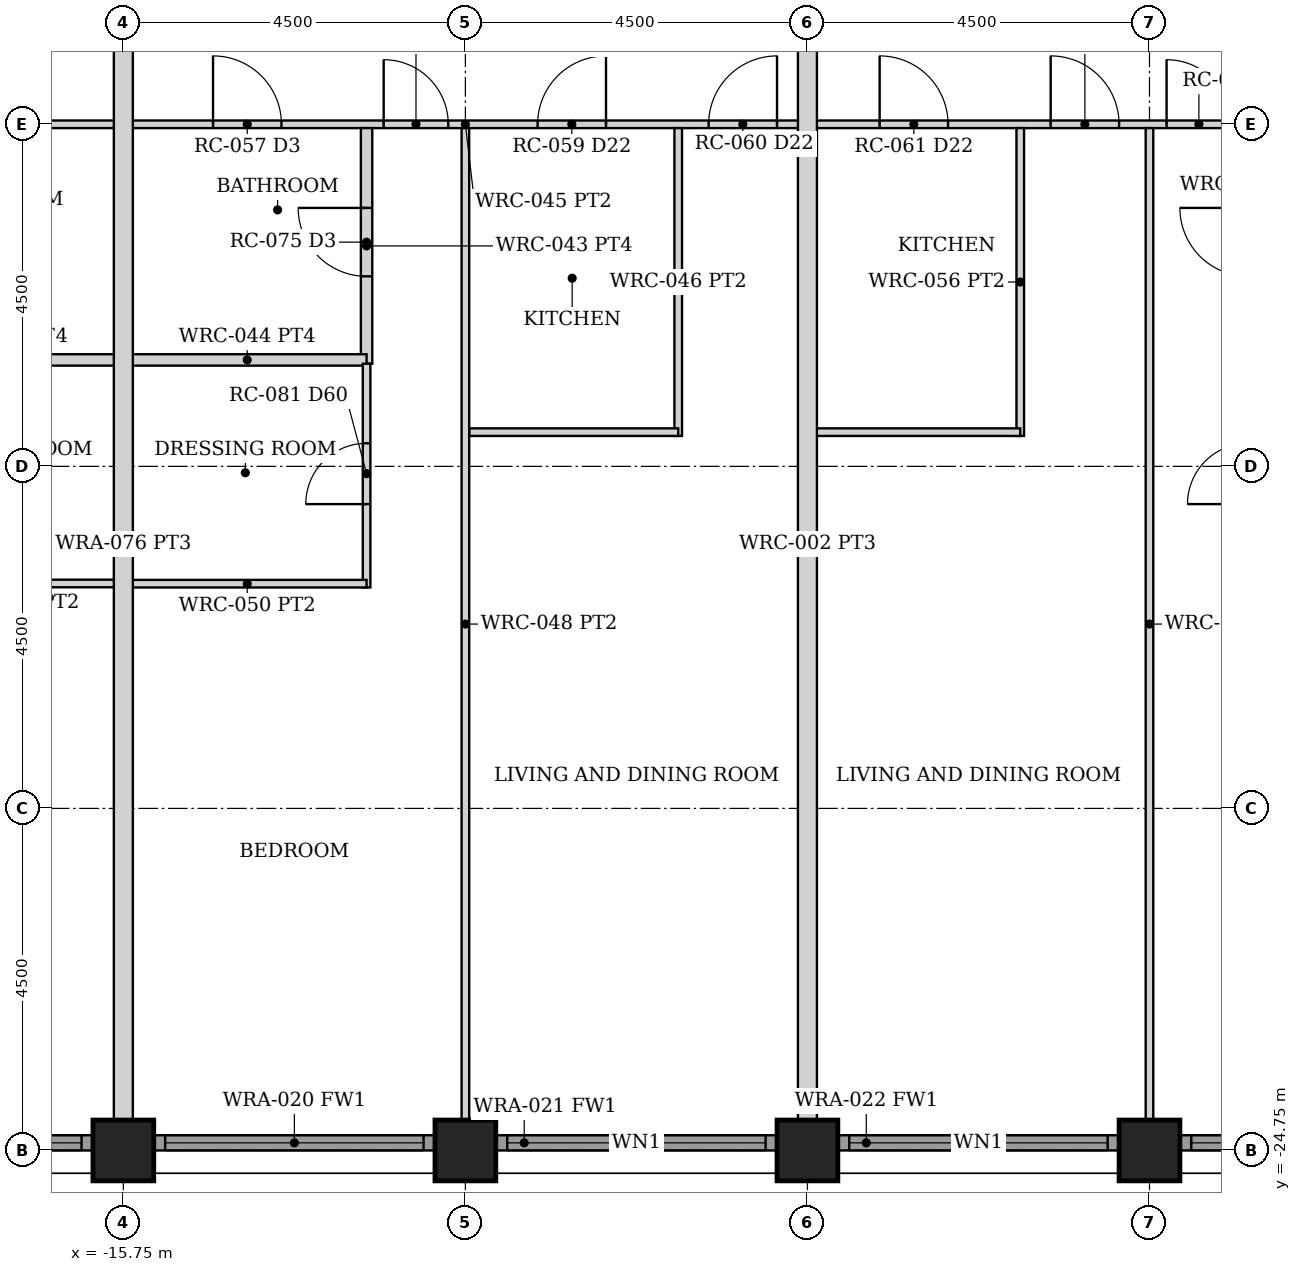
"""IFC4 building model, lengths in metres.
Left out: names, types, materials, properties, quantities, classifications, styles, units other than length and angle.
Written with IfcOpenShell. Run it as: python <this file> out.ifc"""

import sys

from ifc_helpers import new_model, si_unit, direction, frame, frame_2d, origin, origin_2d, place, context, subcontext, project, spatial, rectangle, hollow_rectangle, extrude, element, fill, save


model = new_model("IFC4")
c1 = context("Model", 3, precision=1e-05, world=origin(), true_north=direction((0.0, 1.0)))
c2 = subcontext(c1, "Body", "Model", "MODEL_VIEW")
j1 = project(units=[si_unit("LENGTHUNIT", "METRE"), si_unit("PLANEANGLEUNIT", "RADIAN")], contexts=[c1])
p1 = place(None, origin())
s1 = spatial("IfcSite", under=j1, at=p1, CompositionType="ELEMENT")
p2 = place(p1, origin())
s2 = spatial("IfcBuilding", under=s1, at=p2, CompositionType="ELEMENT")
p3 = place(p2, frame((0.0, 0.0, 47.5)))
s3 = spatial("IfcBuildingStorey", under=s2, at=p3, CompositionType="ELEMENT", Elevation=47.5)
for number, where, z_axis, x_axis in (
    (1, (-15.75, -24.75, 0.0), (0.0, 0.0, 1.0), (0.0, 1.0, 0.0)),
    (2, (-11.25, -24.75, 0.0), (0.0, 0.0, 1.0), (0.0, 1.0, 0.0)),
    (3, (-6.75, -24.75, 0.0), (0.0, 0.0, 1.0), (0.0, 1.0, 0.0)),
    (4, (-2.25, -24.75, 0.0), (0.0, 0.0, 1.0), (0.0, 1.0, 0.0)),
):
    element("IfcColumn", number, at=place(p3, frame(where, z_axis=z_axis, x_axis=x_axis)), inside=s3, PredefinedType="COLUMN", context=c2, shape_type="SweptSolid", body=[
        extrude(hollow_rectangle(XDim=0.8, YDim=0.8, WallThickness=0.07, at=origin_2d()), origin(), (0.0, 0.0, 1.0), 3.5),
    ])
p4 = place(p3, frame((-19.845, -24.65, 0.0), z_axis=(0.0, 0.0, 1.0), x_axis=(1.0, 0.0, 0.0)))
e5 = element("IfcWall", 5, at=p4, inside=s3, PredefinedType="SOLIDWALL", context=c2, shape_type="SweptSolid", body=[
    extrude(rectangle(XDim=3.69, YDim=0.2, at=frame_2d((1.845, 0.0))), origin(), (0.0, 0.0, 1.0), 2.379),
])
p5 = place(p4, frame((0.145, 0.0, 0.3)))
e6 = element("IfcOpeningElement", 6, at=p5, cuts=e5, PredefinedType="OPENING", context=c2, shape_type="SweptSolid", body=[
    extrude(rectangle(XDim=3.4, YDim=1.929, at=frame_2d((1.7, 0.964))), frame((0.0, 0.11, 0.0), z_axis=(0.0, -1.0, 0.0), x_axis=(1.0, 0.0, 0.0)), (0.0, 0.0, 1.0), 0.22),
])
p6 = place(p3, frame((-15.345, -24.65, 0.0), z_axis=(0.0, 0.0, 1.0), x_axis=(1.0, 0.0, 0.0)))
e7 = element("IfcWall", 7, at=p6, inside=s3, PredefinedType="SOLIDWALL", context=c2, shape_type="SweptSolid", body=[
    extrude(rectangle(XDim=3.69, YDim=0.2, at=frame_2d((1.845, 0.0))), origin(), (0.0, 0.0, 1.0), 2.379),
])
p7 = place(p6, frame((0.145, 0.0, 0.3)))
e8 = element("IfcOpeningElement", 8, at=p7, cuts=e7, PredefinedType="OPENING", context=c2, shape_type="SweptSolid", body=[
    extrude(rectangle(XDim=3.4, YDim=1.929, at=frame_2d((1.7, 0.964))), frame((0.0, 0.11, 0.0), z_axis=(0.0, -1.0, 0.0), x_axis=(1.0, 0.0, 0.0)), (0.0, 0.0, 1.0), 0.22),
])
p8 = place(p3, frame((-10.845, -24.65, 0.0), z_axis=(0.0, 0.0, 1.0), x_axis=(1.0, 0.0, 0.0)))
e9 = element("IfcWall", 9, at=p8, inside=s3, PredefinedType="SOLIDWALL", context=c2, shape_type="SweptSolid", body=[
    extrude(rectangle(XDim=3.69, YDim=0.2, at=frame_2d((1.845, 0.0))), origin(), (0.0, 0.0, 1.0), 2.379),
])
p9 = place(p8, frame((0.145, 0.0, 0.3)))
e10 = element("IfcOpeningElement", 10, at=p9, cuts=e9, PredefinedType="OPENING", context=c2, shape_type="SweptSolid", body=[
    extrude(rectangle(XDim=3.4, YDim=1.929, at=frame_2d((1.7, 0.964))), frame((0.0, 0.11, 0.0), z_axis=(0.0, -1.0, 0.0), x_axis=(1.0, 0.0, 0.0)), (0.0, 0.0, 1.0), 0.22),
])
p10 = place(p3, frame((-6.345, -24.65, 0.0), z_axis=(0.0, 0.0, 1.0), x_axis=(1.0, 0.0, 0.0)))
e11 = element("IfcWall", 11, at=p10, inside=s3, PredefinedType="SOLIDWALL", context=c2, shape_type="SweptSolid", body=[
    extrude(rectangle(XDim=3.69, YDim=0.2, at=frame_2d((1.845, 0.0))), origin(), (0.0, 0.0, 1.0), 2.379),
])
p11 = place(p10, frame((0.145, 0.0, 0.3)))
e12 = element("IfcOpeningElement", 12, at=p11, cuts=e11, PredefinedType="OPENING", context=c2, shape_type="SweptSolid", body=[
    extrude(rectangle(XDim=3.4, YDim=1.929, at=frame_2d((1.7, 0.964))), frame((0.0, 0.11, 0.0), z_axis=(0.0, -1.0, 0.0), x_axis=(1.0, 0.0, 0.0)), (0.0, 0.0, 1.0), 0.22),
])
p12 = place(p3, frame((-1.845, -24.65, 0.0), z_axis=(0.0, 0.0, 1.0), x_axis=(1.0, 0.0, 0.0)))
e13 = element("IfcWall", 13, at=p12, inside=s3, PredefinedType="SOLIDWALL", context=c2, shape_type="SweptSolid", body=[
    extrude(rectangle(XDim=3.69, YDim=0.2, at=frame_2d((1.845, 0.0))), origin(), (0.0, 0.0, 1.0), 2.379),
])
p13 = place(p12, frame((0.145, 0.0, 0.3)))
e14 = element("IfcOpeningElement", 14, at=p13, cuts=e13, PredefinedType="OPENING", context=c2, shape_type="SweptSolid", body=[
    extrude(rectangle(XDim=3.4, YDim=1.929, at=frame_2d((1.7, 0.964))), frame((0.0, 0.11, 0.0), z_axis=(0.0, -1.0, 0.0), x_axis=(1.0, 0.0, 0.0)), (0.0, 0.0, 1.0), 0.22),
])
p14 = place(p3, frame((-24.35, -11.25, 0.0), z_axis=(0.0, 0.0, 1.0), x_axis=(1.0, 0.0, 0.0)))
e15 = element("IfcWall", 15, at=p14, inside=s3, PredefinedType="PARTITIONING", context=c2, shape_type="SweptSolid", body=[
    extrude(rectangle(XDim=8.5, YDim=0.1, at=frame_2d((4.25, 0.0))), origin(), (0.0, 0.0, 1.0), 2.373),
])
p15 = place(p14, frame((2.375, 0.0, 0.0)))
e16 = element("IfcOpeningElement", 16, at=p15, cuts=e15, PredefinedType="OPENING", context=c2, shape_type="SweptSolid", body=[
    extrude(rectangle(XDim=0.9, YDim=2.1, at=frame_2d((0.45, 1.05))), frame((0.0, 0.06, 0.0), z_axis=(0.0, -1.0, 0.0), x_axis=(1.0, 0.0, 0.0)), (0.0, 0.0, 1.0), 0.12),
])
p16 = place(p14, frame((0.35, 0.0, 0.0)))
e17 = element("IfcOpeningElement", 17, at=p16, cuts=e15, PredefinedType="OPENING", context=c2, shape_type="SweptSolid", body=[
    extrude(rectangle(XDim=0.9, YDim=2.1, at=frame_2d((0.45, 1.05))), frame((0.0, 0.06, 0.0), z_axis=(0.0, -1.0, 0.0), x_axis=(1.0, 0.0, 0.0)), (0.0, 0.0, 1.0), 0.12),
])
p17 = place(p14, frame((4.325, 0.0, 0.0)))
e18 = element("IfcOpeningElement", 18, at=p17, cuts=e15, PredefinedType="OPENING", context=c2, shape_type="SweptSolid", body=[
    extrude(rectangle(XDim=0.85, YDim=2.1, at=frame_2d((0.425, 1.05))), frame((0.0, 0.06, 0.0), z_axis=(0.0, -1.0, 0.0), x_axis=(1.0, 0.0, 0.0)), (0.0, 0.0, 1.0), 0.12),
])
p18 = place(p14, frame((6.52, 0.0, 0.0)))
e19 = element("IfcOpeningElement", 19, at=p18, cuts=e15, PredefinedType="OPENING", context=c2, shape_type="SweptSolid", body=[
    extrude(rectangle(XDim=0.9, YDim=2.1, at=frame_2d((0.45, 1.05))), frame((0.0, 0.06, 0.0), z_axis=(0.0, -1.0, 0.0), x_axis=(1.0, 0.0, 0.0)), (0.0, 0.0, 1.0), 0.12),
])
p19 = place(p3, frame((-18.95, -14.35, 0.0), z_axis=(0.0, 0.0, 1.0), x_axis=(1.0, 0.0, 0.0)))
e20 = element("IfcWall", 20, at=p19, inside=s3, PredefinedType="PARTITIONING", context=c2, shape_type="SweptSolid", body=[
    extrude(rectangle(XDim=3.14, YDim=0.15, at=frame_2d((1.57, 0.0))), origin(), (0.0, 0.0, 1.0), 2.373),
])
p20 = place(p3, frame((-18.95, -17.291, 0.0), z_axis=(0.0, 0.0, 1.0), x_axis=(1.0, 0.0, 0.0)))
e21 = element("IfcWall", 21, at=p20, inside=s3, PredefinedType="PARTITIONING", context=c2, shape_type="SweptSolid", body=[
    extrude(rectangle(XDim=3.14, YDim=0.1, at=frame_2d((1.57, 0.0))), origin(), (0.0, 0.0, 1.0), 2.373),
])
p21 = place(p3, frame((-15.65, -11.25, 0.0), z_axis=(0.0, 0.0, 1.0), x_axis=(1.0, 0.0, 0.0)))
e22 = element("IfcWall", 22, at=p21, inside=s3, PredefinedType="PARTITIONING", context=c2, shape_type="SweptSolid", body=[
    extrude(rectangle(XDim=8.8, YDim=0.1, at=frame_2d((4.4, 0.0))), origin(), (0.0, 0.0, 1.0), 2.373),
])
p22 = place(p21, frame((5.35, 0.0, 0.0)))
e23 = element("IfcOpeningElement", 23, at=p22, cuts=e22, PredefinedType="OPENING", context=c2, shape_type="SweptSolid", body=[
    extrude(rectangle(XDim=0.9, YDim=2.1, at=frame_2d((0.45, 1.05))), frame((0.0, 0.06, 0.0), z_axis=(0.0, -1.0, 0.0), x_axis=(1.0, 0.0, 0.0)), (0.0, 0.0, 1.0), 0.12),
])
p23 = place(p21, frame((7.6, 0.0, 0.0)))
e24 = element("IfcOpeningElement", 24, at=p23, cuts=e22, PredefinedType="OPENING", context=c2, shape_type="SweptSolid", body=[
    extrude(rectangle(XDim=0.9, YDim=2.1, at=frame_2d((0.45, 1.05))), frame((0.0, 0.06, 0.0), z_axis=(0.0, -1.0, 0.0), x_axis=(1.0, 0.0, 0.0)), (0.0, 0.0, 1.0), 0.12),
])
p24 = place(p21, frame((3.325, 0.0, 0.0)))
e25 = element("IfcOpeningElement", 25, at=p24, cuts=e22, PredefinedType="OPENING", context=c2, shape_type="SweptSolid", body=[
    extrude(rectangle(XDim=0.85, YDim=2.1, at=frame_2d((0.425, 1.05))), frame((0.0, 0.06, 0.0), z_axis=(0.0, -1.0, 0.0), x_axis=(1.0, 0.0, 0.0)), (0.0, 0.0, 1.0), 0.12),
])
p25 = place(p21, frame((1.08, 0.0, 0.0)))
e26 = element("IfcOpeningElement", 26, at=p25, cuts=e22, PredefinedType="OPENING", context=c2, shape_type="SweptSolid", body=[
    extrude(rectangle(XDim=0.9, YDim=2.1, at=frame_2d((0.45, 1.05))), frame((0.0, 0.06, 0.0), z_axis=(0.0, -1.0, 0.0), x_axis=(1.0, 0.0, 0.0)), (0.0, 0.0, 1.0), 0.12),
])
p26 = place(p3, frame((-8.45, -15.35, 0.0), z_axis=(0.0, 0.0, 1.0), x_axis=(0.0, 1.0, 0.0)))
e27 = element("IfcWall", 27, at=p26, inside=s3, PredefinedType="PARTITIONING", context=c2, shape_type="SweptSolid", body=[
    extrude(rectangle(XDim=4.05, YDim=0.1, at=frame_2d((2.025, 0.0))), origin(), (0.0, 0.0, 1.0), 2.373),
])
p27 = place(p3, frame((-11.2, -15.3, 0.0), z_axis=(0.0, 0.0, 1.0), x_axis=(1.0, 0.0, 0.0)))
e28 = element("IfcWall", 28, at=p27, inside=s3, PredefinedType="PARTITIONING", context=c2, shape_type="SweptSolid", body=[
    extrude(rectangle(XDim=2.75, YDim=0.1, at=frame_2d((1.375, 0.0))), origin(), (0.0, 0.0, 1.0), 2.373),
])
p28 = place(p3, frame((-11.25, -24.35, 0.0), z_axis=(0.0, 0.0, 1.0), x_axis=(0.0, 1.0, 0.0)))
e29 = element("IfcWall", 29, at=p28, inside=s3, PredefinedType="PARTITIONING", context=c2, shape_type="SweptSolid", body=[
    extrude(rectangle(XDim=13.05, YDim=0.1, at=frame_2d((6.525, 0.0))), origin(), (0.0, 0.0, 1.0), 2.373),
])
p29 = place(p3, frame((-12.55, -14.4, 0.0), z_axis=(0.0, 0.0, 1.0), x_axis=(0.0, 1.0, 0.0)))
e30 = element("IfcWall", 30, at=p29, inside=s3, PredefinedType="PARTITIONING", context=c2, shape_type="SweptSolid", body=[
    extrude(rectangle(XDim=3.1, YDim=0.15, at=frame_2d((1.55, 0.0))), origin(), (0.0, 0.0, 1.0), 2.373),
])
p30 = place(p29, frame((1.15, 0.0, 0.0)))
e31 = element("IfcOpeningElement", 31, at=p30, cuts=e30, PredefinedType="OPENING", context=c2, shape_type="SweptSolid", body=[
    extrude(rectangle(XDim=0.9, YDim=2.1, at=frame_2d((0.45, 1.05))), frame((0.0, 0.085, 0.0), z_axis=(0.0, -1.0, 0.0), x_axis=(1.0, 0.0, 0.0)), (0.0, 0.0, 1.0), 0.17),
])
p31 = place(p3, frame((-15.69, -14.35, 0.0), z_axis=(0.0, 0.0, 1.0), x_axis=(1.0, 0.0, 0.0)))
e32 = element("IfcWall", 32, at=p31, inside=s3, PredefinedType="PARTITIONING", context=c2, shape_type="SweptSolid", body=[
    extrude(rectangle(XDim=3.14, YDim=0.15, at=frame_2d((1.57, 0.0))), origin(), (0.0, 0.0, 1.0), 2.373),
])
p32 = place(p3, frame((-12.55, -17.344, 0.0), z_axis=(0.0, 0.0, 1.0), x_axis=(0.0, 1.0, 0.0)))
e33 = element("IfcWall", 33, at=p32, inside=s3, PredefinedType="PARTITIONING", context=c2, shape_type="SweptSolid", body=[
    extrude(rectangle(XDim=2.944, YDim=0.1, at=frame_2d((1.472, 0.0))), origin(), (0.0, 0.0, 1.0), 2.373),
])
p33 = place(p32, frame((1.097, 0.0, 0.0)))
e34 = element("IfcOpeningElement", 34, at=p33, cuts=e33, PredefinedType="OPENING", context=c2, shape_type="SweptSolid", body=[
    extrude(rectangle(XDim=0.8, YDim=2.1, at=frame_2d((0.4, 1.05))), frame((0.0, 0.06, 0.0), z_axis=(0.0, -1.0, 0.0), x_axis=(1.0, 0.0, 0.0)), (0.0, 0.0, 1.0), 0.12),
])
p34 = place(p3, frame((-15.69, -17.293, 0.0), z_axis=(0.0, 0.0, 1.0), x_axis=(1.0, 0.0, 0.0)))
e35 = element("IfcWall", 35, at=p34, inside=s3, PredefinedType="PARTITIONING", context=c2, shape_type="SweptSolid", body=[
    extrude(rectangle(XDim=3.14, YDim=0.1, at=frame_2d((1.57, 0.0))), origin(), (0.0, 0.0, 1.0), 2.373),
])
p35 = place(p3, frame((-6.65, -11.25, 0.0), z_axis=(0.0, 0.0, 1.0), x_axis=(1.0, 0.0, 0.0)))
e36 = element("IfcWall", 36, at=p35, inside=s3, PredefinedType="PARTITIONING", context=c2, shape_type="SweptSolid", body=[
    extrude(rectangle(XDim=13.3, YDim=0.1, at=frame_2d((6.65, 0.0))), origin(), (0.0, 0.0, 1.0), 2.373),
])
p36 = place(p35, frame((0.85, 0.0, 0.0)))
e37 = element("IfcOpeningElement", 37, at=p36, cuts=e36, PredefinedType="OPENING", context=c2, shape_type="SweptSolid", body=[
    extrude(rectangle(XDim=0.9, YDim=2.1, at=frame_2d((0.45, 1.05))), frame((0.0, 0.06, 0.0), z_axis=(0.0, -1.0, 0.0), x_axis=(1.0, 0.0, 0.0)), (0.0, 0.0, 1.0), 0.12),
])
p37 = place(p35, frame((3.1, 0.0, 0.0)))
e38 = element("IfcOpeningElement", 38, at=p37, cuts=e36, PredefinedType="OPENING", context=c2, shape_type="SweptSolid", body=[
    extrude(rectangle(XDim=0.9, YDim=2.1, at=frame_2d((0.45, 1.05))), frame((0.0, 0.06, 0.0), z_axis=(0.0, -1.0, 0.0), x_axis=(1.0, 0.0, 0.0)), (0.0, 0.0, 1.0), 0.12),
])
p38 = place(p35, frame((4.625, 0.0, 0.0)))
e39 = element("IfcOpeningElement", 39, at=p38, cuts=e36, PredefinedType="OPENING", context=c2, shape_type="SweptSolid", body=[
    extrude(rectangle(XDim=0.85, YDim=2.1, at=frame_2d((0.425, 1.05))), frame((0.0, 0.06, 0.0), z_axis=(0.0, -1.0, 0.0), x_axis=(1.0, 0.0, 0.0)), (0.0, 0.0, 1.0), 0.12),
])
p39 = place(p35, frame((6.82, 0.0, 0.0)))
e40 = element("IfcOpeningElement", 40, at=p39, cuts=e36, PredefinedType="OPENING", context=c2, shape_type="SweptSolid", body=[
    extrude(rectangle(XDim=0.9, YDim=2.1, at=frame_2d((0.45, 1.05))), frame((0.0, 0.06, 0.0), z_axis=(0.0, -1.0, 0.0), x_axis=(1.0, 0.0, 0.0)), (0.0, 0.0, 1.0), 0.12),
])
p40 = place(p35, frame((9.125, 0.0, 0.0)))
e41 = element("IfcOpeningElement", 41, at=p40, cuts=e36, PredefinedType="OPENING", context=c2, shape_type="SweptSolid", body=[
    extrude(rectangle(XDim=0.85, YDim=2.1, at=frame_2d((0.425, 1.05))), frame((0.0, 0.06, 0.0), z_axis=(0.0, -1.0, 0.0), x_axis=(1.0, 0.0, 0.0)), (0.0, 0.0, 1.0), 0.12),
])
p41 = place(p3, frame((-3.95, -15.35, 0.0), z_axis=(0.0, 0.0, 1.0), x_axis=(0.0, 1.0, 0.0)))
e42 = element("IfcWall", 42, at=p41, inside=s3, PredefinedType="PARTITIONING", context=c2, shape_type="SweptSolid", body=[
    extrude(rectangle(XDim=4.05, YDim=0.1, at=frame_2d((2.025, 0.0))), origin(), (0.0, 0.0, 1.0), 2.373),
])
p42 = place(p3, frame((-6.69, -15.3, 0.0), z_axis=(0.0, 0.0, 1.0), x_axis=(1.0, 0.0, 0.0)))
e43 = element("IfcWall", 43, at=p42, inside=s3, PredefinedType="PARTITIONING", context=c2, shape_type="SweptSolid", body=[
    extrude(rectangle(XDim=2.74, YDim=0.1, at=frame_2d((1.37, 0.0))), origin(), (0.0, 0.0, 1.0), 2.373),
])
p43 = place(p3, frame((-2.25, -24.35, 0.0), z_axis=(0.0, 0.0, 1.0), x_axis=(0.0, 1.0, 0.0)))
e44 = element("IfcWall", 44, at=p43, inside=s3, PredefinedType="PARTITIONING", context=c2, shape_type="SweptSolid", body=[
    extrude(rectangle(XDim=13.05, YDim=0.1, at=frame_2d((6.525, 0.0))), origin(), (0.0, 0.0, 1.0), 2.373),
])
for number, where, z_axis, x_axis in (
    (45, (-15.75, -24.35, 0.0), (0.0, 0.0, 1.0), (0.0, 1.0, 0.0)),
    (46, (-6.75, -24.35, 0.0), (0.0, 0.0, 1.0), (0.0, 1.0, 0.0)),
):
    element("IfcWall", number, at=place(p3, frame(where, z_axis=z_axis, x_axis=x_axis)), inside=s3, PredefinedType="PARTITIONING", context=c2, shape_type="SweptSolid", body=[
        extrude(rectangle(XDim=15.15, YDim=0.25, at=frame_2d((7.575, 0.0))), origin(), (0.0, 0.0, 1.0), 2.373),
    ])
p44 = place(p5, origin())
e47 = element("IfcWindow", 47, at=p44, inside=s3, PartitioningType="SINGLE_PANEL", PredefinedType="WINDOW", context=c2, shape_type="SweptSolid", body=[
    extrude(rectangle(XDim=3.4, YDim=1.929, at=frame_2d((1.7, 0.964))), frame((0.0, 0.03, 0.0), z_axis=(0.0, -1.0, 0.0), x_axis=(1.0, 0.0, 0.0)), (0.0, 0.0, 1.0), 0.06),
])
fill(e6, e47)
p45 = place(p7, origin())
e48 = element("IfcWindow", 48, at=p45, inside=s3, PartitioningType="SINGLE_PANEL", PredefinedType="WINDOW", context=c2, shape_type="SweptSolid", body=[
    extrude(rectangle(XDim=3.4, YDim=1.929, at=frame_2d((1.7, 0.964))), frame((0.0, 0.03, 0.0), z_axis=(0.0, -1.0, 0.0), x_axis=(1.0, 0.0, 0.0)), (0.0, 0.0, 1.0), 0.06),
])
fill(e8, e48)
p46 = place(p9, origin())
e49 = element("IfcWindow", 49, at=p46, inside=s3, PartitioningType="SINGLE_PANEL", PredefinedType="WINDOW", context=c2, shape_type="SweptSolid", body=[
    extrude(rectangle(XDim=3.4, YDim=1.929, at=frame_2d((1.7, 0.964))), frame((0.0, 0.03, 0.0), z_axis=(0.0, -1.0, 0.0), x_axis=(1.0, 0.0, 0.0)), (0.0, 0.0, 1.0), 0.06),
])
fill(e10, e49)
p47 = place(p11, origin())
e50 = element("IfcWindow", 50, at=p47, inside=s3, PartitioningType="SINGLE_PANEL", PredefinedType="WINDOW", context=c2, shape_type="SweptSolid", body=[
    extrude(rectangle(XDim=3.4, YDim=1.929, at=frame_2d((1.7, 0.964))), frame((0.0, 0.03, 0.0), z_axis=(0.0, -1.0, 0.0), x_axis=(1.0, 0.0, 0.0)), (0.0, 0.0, 1.0), 0.06),
])
fill(e12, e50)
p48 = place(p13, origin())
e51 = element("IfcWindow", 51, at=p48, inside=s3, PartitioningType="SINGLE_PANEL", PredefinedType="WINDOW", context=c2, shape_type="SweptSolid", body=[
    extrude(rectangle(XDim=3.4, YDim=1.929, at=frame_2d((1.7, 0.964))), frame((0.0, 0.03, 0.0), z_axis=(0.0, -1.0, 0.0), x_axis=(1.0, 0.0, 0.0)), (0.0, 0.0, 1.0), 0.06),
])
fill(e14, e51)
p49 = place(p22, origin())
e52 = element("IfcDoor", 52, at=p49, inside=s3, OperationType="SINGLE_SWING_RIGHT", PredefinedType="DOOR", context=c2, shape_type="SweptSolid", body=[
    extrude(rectangle(XDim=0.9, YDim=2.1, at=frame_2d((0.45, 1.05))), frame((0.0, 0.025, 0.0), z_axis=(0.0, -1.0, 0.0), x_axis=(1.0, 0.0, 0.0)), (0.0, 0.0, 1.0), 0.05),
])
fill(e23, e52)
p50 = place(p23, origin())
e53 = element("IfcDoor", 53, at=p50, inside=s3, OperationType="SINGLE_SWING_RIGHT", PredefinedType="DOOR", context=c2, shape_type="SweptSolid", body=[
    extrude(rectangle(XDim=0.9, YDim=2.1, at=frame_2d((0.45, 1.05))), frame((0.0, 0.025, 0.0), z_axis=(0.0, -1.0, 0.0), x_axis=(1.0, 0.0, 0.0)), (0.0, 0.0, 1.0), 0.05),
])
fill(e24, e53)
p51 = place(p24, origin())
e54 = element("IfcDoor", 54, at=p51, inside=s3, OperationType="SINGLE_SWING_LEFT", PredefinedType="DOOR", context=c2, shape_type="SweptSolid", body=[
    extrude(rectangle(XDim=0.85, YDim=2.1, at=frame_2d((0.425, 1.05))), frame((0.0, 0.025, 0.0), z_axis=(0.0, -1.0, 0.0), x_axis=(1.0, 0.0, 0.0)), (0.0, 0.0, 1.0), 0.05),
])
fill(e25, e54)
p52 = place(p30, origin())
e55 = element("IfcDoor", 55, at=p52, inside=s3, OperationType="SINGLE_SWING_RIGHT", PredefinedType="DOOR", context=c2, shape_type="SweptSolid", body=[
    extrude(rectangle(XDim=0.9, YDim=2.1, at=frame_2d((0.45, 1.05))), frame((0.0, 0.025, 0.0), z_axis=(0.0, -1.0, 0.0), x_axis=(1.0, 0.0, 0.0)), (0.0, 0.0, 1.0), 0.05),
])
fill(e31, e55)
p53 = place(p25, origin())
e56 = element("IfcDoor", 56, at=p53, inside=s3, OperationType="SINGLE_SWING_LEFT", PredefinedType="DOOR", context=c2, shape_type="SweptSolid", body=[
    extrude(rectangle(XDim=0.9, YDim=2.1, at=frame_2d((0.45, 1.05))), frame((0.0, 0.025, 0.0), z_axis=(0.0, -1.0, 0.0), x_axis=(1.0, 0.0, 0.0)), (0.0, 0.0, 1.0), 0.05),
])
fill(e26, e56)
p54 = place(p33, origin())
e57 = element("IfcDoor", 57, at=p54, inside=s3, OperationType="SINGLE_SWING_LEFT", PredefinedType="DOOR", context=c2, shape_type="SweptSolid", body=[
    extrude(rectangle(XDim=0.8, YDim=2.1, at=frame_2d((0.4, 1.05))), frame((0.0, 0.025, 0.0), z_axis=(0.0, -1.0, 0.0), x_axis=(1.0, 0.0, 0.0)), (0.0, 0.0, 1.0), 0.05),
])
fill(e34, e57)
p55 = place(p36, origin())
e58 = element("IfcDoor", 58, at=p55, inside=s3, OperationType="SINGLE_SWING_LEFT", PredefinedType="DOOR", context=c2, shape_type="SweptSolid", body=[
    extrude(rectangle(XDim=0.9, YDim=2.1, at=frame_2d((0.45, 1.05))), frame((0.0, 0.025, 0.0), z_axis=(0.0, -1.0, 0.0), x_axis=(1.0, 0.0, 0.0)), (0.0, 0.0, 1.0), 0.05),
])
fill(e37, e58)
p56 = place(p37, origin())
e59 = element("IfcDoor", 59, at=p56, inside=s3, OperationType="SINGLE_SWING_LEFT", PredefinedType="DOOR", context=c2, shape_type="SweptSolid", body=[
    extrude(rectangle(XDim=0.9, YDim=2.1, at=frame_2d((0.45, 1.05))), frame((0.0, 0.025, 0.0), z_axis=(0.0, -1.0, 0.0), x_axis=(1.0, 0.0, 0.0)), (0.0, 0.0, 1.0), 0.05),
])
fill(e38, e59)
p57 = place(p38, origin())
e60 = element("IfcDoor", 60, at=p57, inside=s3, OperationType="SINGLE_SWING_LEFT", PredefinedType="DOOR", context=c2, shape_type="SweptSolid", body=[
    extrude(rectangle(XDim=0.85, YDim=2.1, at=frame_2d((0.425, 1.05))), frame((0.0, 0.025, 0.0), z_axis=(0.0, -1.0, 0.0), x_axis=(1.0, 0.0, 0.0)), (0.0, 0.0, 1.0), 0.05),
])
fill(e39, e60)
save(model, sys.argv[1])
